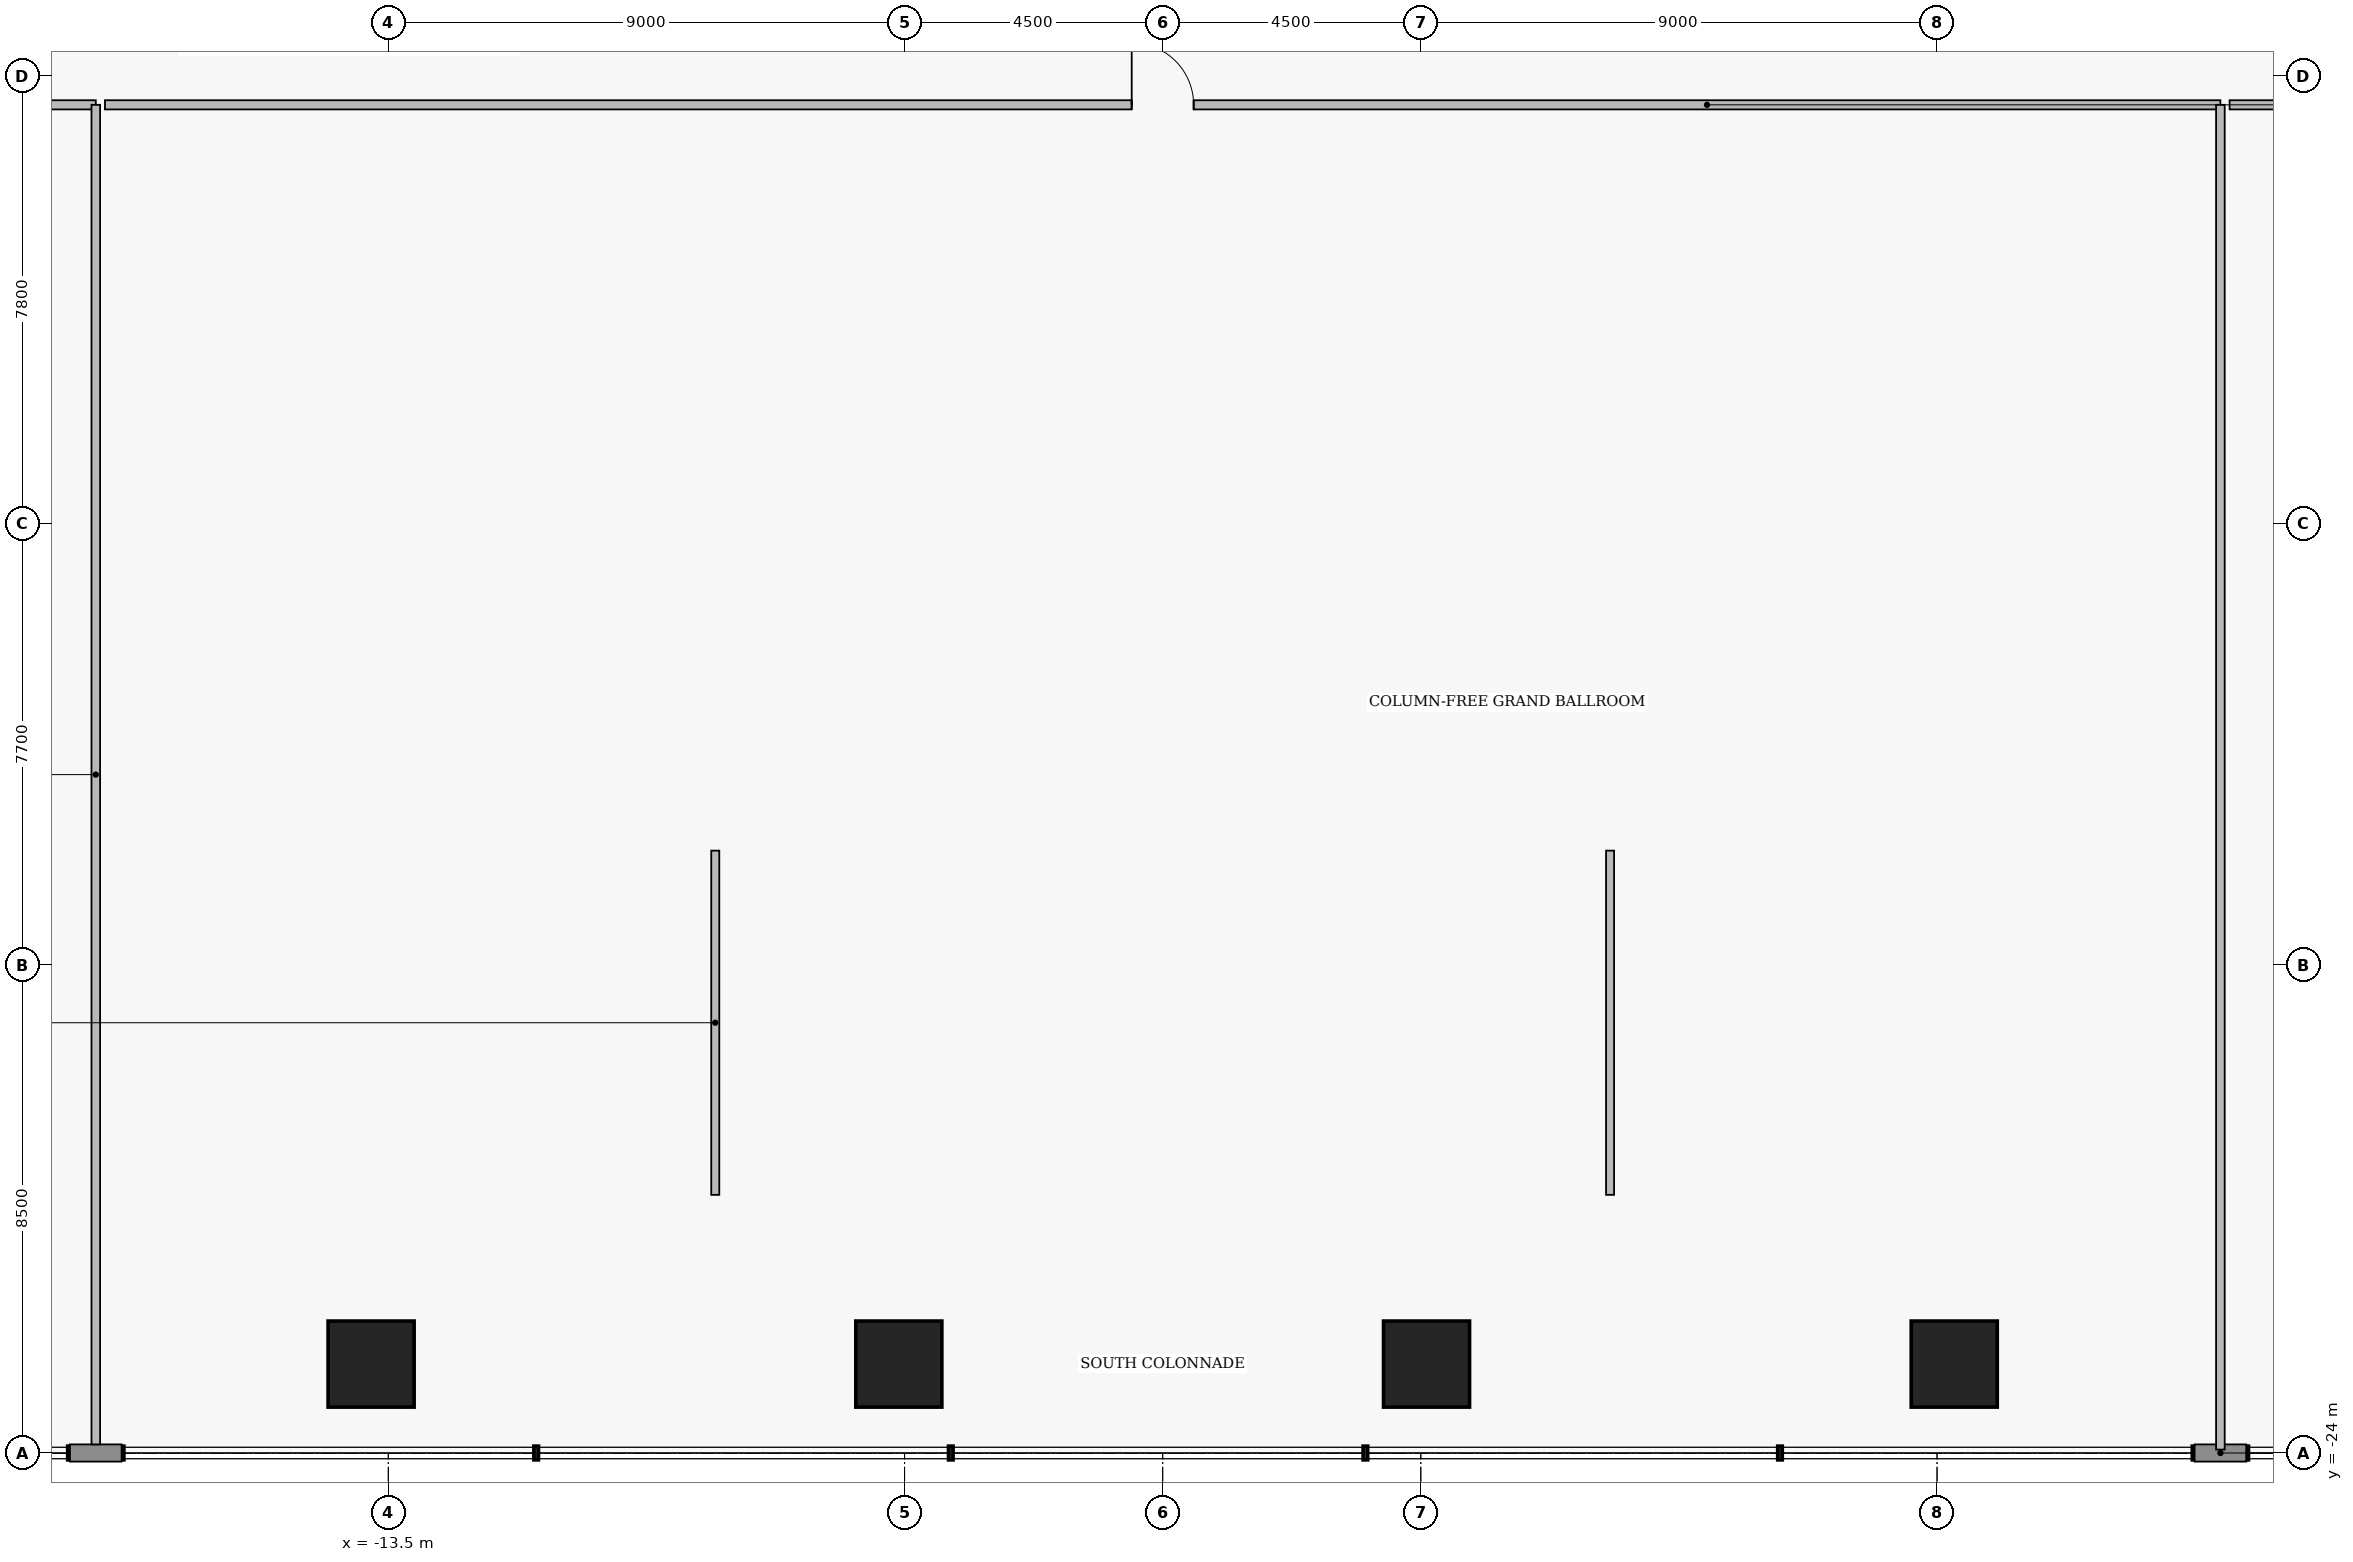
"""IFC4 building model, lengths in metres.
Left out: names, types, materials, properties, quantities, classifications, styles, units other than length and angle.
Written with IfcOpenShell. Run it as: python <this file> out.ifc"""

import sys

from ifc_helpers import new_model, si_unit, direction, frame, frame_2d, origin, origin_2d, place, context, subcontext, project, spatial, rectangle, extrude, element, fill, save


model = new_model("IFC4")
c1 = context("Model", 3, precision=1e-05, world=origin(), true_north=direction((0.0, 1.0)))
c2 = subcontext(c1, "Body", "Model", "MODEL_VIEW")
j1 = project(units=[si_unit("LENGTHUNIT", "METRE"), si_unit("PLANEANGLEUNIT", "RADIAN")], contexts=[c1])
p1 = place(None, origin())
s1 = spatial("IfcSite", under=j1, at=p1, CompositionType="ELEMENT")
p2 = place(p1, origin())
s2 = spatial("IfcBuilding", under=s1, at=p2, CompositionType="ELEMENT")
p3 = place(p2, frame((0.0, 0.0, 11.4)))
s3 = spatial("IfcBuildingStorey", under=s2, at=p3, CompositionType="ELEMENT", Elevation=11.4)
for number, where, z_axis, x_axis in (
    (1, (-13.8, -22.45, 0.0), (0.0, 0.0, 1.0), (1.0, 0.0, 0.0)),
    (2, (-4.6, -22.45, 0.0), (0.0, 0.0, 1.0), (1.0, 0.0, 0.0)),
    (3, (4.6, -22.45, 0.0), (0.0, 0.0, 1.0), (1.0, 0.0, 0.0)),
    (4, (13.8, -22.45, 0.0), (0.0, 0.0, 1.0), (1.0, 0.0, 0.0)),
):
    element("IfcColumn", number, at=place(p3, frame(where, z_axis=z_axis, x_axis=x_axis)), inside=s3, PredefinedType="COLUMN", context=c2, shape_type="SweptSolid", body=[
        extrude(rectangle(XDim=1.5, YDim=1.5, at=origin_2d()), origin(), (0.0, 0.0, 1.0), 6.6),
    ])
p4 = place(p3, frame((18.89, -24.0, 0.0), z_axis=(0.0, 0.0, 1.0), x_axis=(-1.0, 0.0, 0.0)))
e5 = element("IfcWall", 5, at=p4, inside=s3, PredefinedType="STANDARD", context=c2, shape_type="SweptSolid", body=[
    extrude(rectangle(XDim=0.9, YDim=0.3, at=frame_2d((0.45, 0.0))), origin(), (0.0, 0.0, 1.0), 6.34),
])
p5 = place(p3, frame((-18.15, -24.0, 0.0), z_axis=(0.0, 0.0, 1.0), x_axis=(-1.0, 0.0, 0.0)))
e6 = element("IfcWall", 6, at=p5, inside=s3, PredefinedType="STANDARD", context=c2, shape_type="SweptSolid", body=[
    extrude(rectangle(XDim=0.9, YDim=0.3, at=frame_2d((0.45, 0.0))), origin(), (0.0, 0.0, 1.0), 6.34),
])
p6 = place(p3, frame((-27.9, -0.5, 0.0), z_axis=(0.0, 0.0, 1.0), x_axis=(1.0, 0.0, 0.0)))
e7 = element("IfcWall", 7, at=p6, inside=s3, PredefinedType="PARTITIONING", context=c2, shape_type="SweptSolid", body=[
    extrude(rectangle(XDim=9.3, YDim=0.16, at=frame_2d((4.65, 0.0))), origin(), (0.0, 0.0, 1.0), 6.34),
])
p7 = place(p6, frame((5.3, 0.0, 0.0)))
e8 = element("IfcOpeningElement", 8, at=p7, cuts=e7, PredefinedType="OPENING", context=c2, shape_type="SweptSolid", body=[
    extrude(rectangle(XDim=1.0, YDim=2.15, at=frame_2d((0.5, 1.075))), frame((0.0, 0.09, 0.0), z_axis=(0.0, -1.0, 0.0), x_axis=(1.0, 0.0, 0.0)), (0.0, 0.0, 1.0), 0.18),
])
p8 = place(p3, frame((-18.44, -0.5, 0.0), z_axis=(0.0, 0.0, 1.0), x_axis=(1.0, 0.0, 0.0)))
e9 = element("IfcWall", 9, at=p8, inside=s3, PredefinedType="PARTITIONING", context=c2, shape_type="SweptSolid", body=[
    extrude(rectangle(XDim=36.88, YDim=0.16, at=frame_2d((18.44, 0.0))), origin(), (0.0, 0.0, 1.0), 6.34),
])
p9 = place(p8, frame((17.9, 0.0, 0.0)))
e10 = element("IfcOpeningElement", 10, at=p9, cuts=e9, PredefinedType="OPENING", context=c2, shape_type="SweptSolid", body=[
    extrude(rectangle(XDim=1.08, YDim=2.18, at=frame_2d((0.54, 1.09))), frame((0.0, 0.09, 0.0), z_axis=(0.0, -1.0, 0.0), x_axis=(1.0, 0.0, 0.0)), (0.0, 0.0, 1.0), 0.18),
])
p10 = place(p3, frame((18.6, -0.5, 0.0), z_axis=(0.0, 0.0, 1.0), x_axis=(1.0, 0.0, 0.0)))
e11 = element("IfcWall", 11, at=p10, inside=s3, PredefinedType="PARTITIONING", context=c2, shape_type="SweptSolid", body=[
    extrude(rectangle(XDim=9.3, YDim=0.16, at=frame_2d((4.65, 0.0))), origin(), (0.0, 0.0, 1.0), 6.34),
])
p11 = place(p10, frame((5.91, 0.0, 0.0)))
e12 = element("IfcOpeningElement", 12, at=p11, cuts=e11, PredefinedType="OPENING", context=c2, shape_type="SweptSolid", body=[
    extrude(rectangle(XDim=1.08, YDim=2.18, at=frame_2d((0.54, 1.09))), frame((0.0, 0.09, 0.0), z_axis=(0.0, -1.0, 0.0), x_axis=(1.0, 0.0, 0.0)), (0.0, 0.0, 1.0), 0.18),
])
p12 = place(p3, frame((-18.6, -23.85, 0.0), z_axis=(0.0, 0.0, 1.0), x_axis=(0.0, 1.0, 0.0)))
e13 = element("IfcWall", 13, at=p12, inside=s3, PredefinedType="PARTITIONING", context=c2, shape_type="SweptSolid", body=[
    extrude(rectangle(XDim=23.35, YDim=0.15, at=frame_2d((11.675, 0.0))), origin(), (0.0, 0.0, 1.0), 6.34),
])
p13 = place(p3, frame((18.44, -23.94, 0.0), z_axis=(0.0, 0.0, 1.0), x_axis=(0.0, 1.0, 0.0)))
e14 = element("IfcWall", 14, at=p13, inside=s3, PredefinedType="PARTITIONING", context=c2, shape_type="SweptSolid", body=[
    extrude(rectangle(XDim=23.44, YDim=0.15, at=frame_2d((11.72, 0.0))), origin(), (0.0, 0.0, 1.0), 6.34),
])
for number, where, z_axis, x_axis in (
    (15, (-7.8, -19.5, 0.0), (0.0, 0.0, 1.0), (0.0, 1.0, 0.0)),
    (16, (7.8, -19.5, 0.0), (0.0, 0.0, 1.0), (0.0, 1.0, 0.0)),
):
    element("IfcWall", number, at=place(p3, frame(where, z_axis=z_axis, x_axis=x_axis)), inside=s3, PredefinedType="MOVABLE", context=c2, shape_type="SweptSolid", body=[
        extrude(rectangle(XDim=6.0, YDim=0.14, at=frame_2d((3.0, 0.0))), origin(), (0.0, 0.0, 1.0), 6.34),
    ])
p14 = place(p9, origin())
e17 = element("IfcDoor", 17, at=p14, inside=s3, OperationType="SINGLE_SWING_LEFT", PredefinedType="DOOR", context=c2, shape_type="SweptSolid", body=[
    extrude(rectangle(XDim=1.08, YDim=2.18, at=frame_2d((0.54, 1.09))), frame((0.0, 0.025, 0.0), z_axis=(0.0, -1.0, 0.0), x_axis=(1.0, 0.0, 0.0)), (0.0, 0.0, 1.0), 0.05),
])
fill(e10, e17)
save(model, sys.argv[1])
